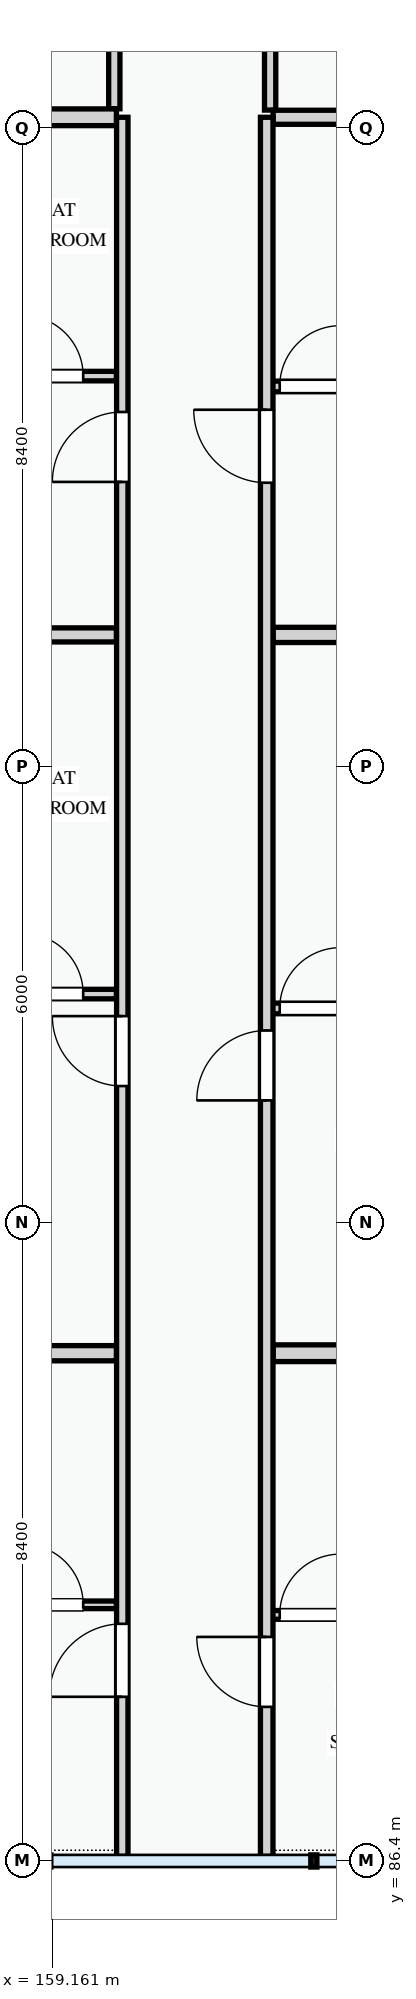
"""IFC4 building model, lengths in metres.
Left out: names, types, materials, properties, quantities, classifications, styles, units other than length and angle.
Written with IfcOpenShell. Run it as: python <this file> out.ifc"""

import sys

from ifc_helpers import new_model, si_unit, direction, frame, frame_2d, origin, place, context, subcontext, project, spatial, rectangle, extrude, element, fill, save


model = new_model("IFC4")
c1 = context("Model", 3, precision=1e-05, world=origin(), true_north=direction((0.0, 1.0)))
c2 = subcontext(c1, "Body", "Model", "MODEL_VIEW")
j1 = project(units=[si_unit("LENGTHUNIT", "METRE"), si_unit("PLANEANGLEUNIT", "RADIAN")], contexts=[c1])
p1 = place(None, origin())
s1 = spatial("IfcSite", under=j1, at=p1, CompositionType="ELEMENT")
p2 = place(p1, origin())
s2 = spatial("IfcBuilding", under=s1, at=p2, CompositionType="ELEMENT")
p3 = place(p2, frame((0.0, 0.0, 37.8)))
s3 = spatial("IfcBuildingStorey", under=s2, at=p3, CompositionType="ELEMENT", Elevation=37.8)
p4 = place(p3, frame((159.975, 113.324, 0.0), z_axis=(0.0, 0.0, 1.0), x_axis=(0.0, -1.0, 0.0)))
e1 = element("IfcWall", 1, at=p4, inside=s3, PredefinedType="PARTITIONING", context=c2, shape_type="SweptSolid", body=[
    extrude(rectangle(XDim=3.872, YDim=0.148, at=frame_2d((1.936, 0.0))), origin(), (0.0, 0.0, 1.0), 3.0),
])
p5 = place(p3, frame((162.025, 113.324, 0.0), z_axis=(0.0, 0.0, 1.0), x_axis=(0.0, -1.0, 0.0)))
e2 = element("IfcWall", 2, at=p5, inside=s3, PredefinedType="PARTITIONING", context=c2, shape_type="SweptSolid", body=[
    extrude(rectangle(XDim=3.889, YDim=0.148, at=frame_2d((1.945, 0.0))), origin(), (0.0, 0.0, 1.0), 3.0),
])
p6 = place(p3, frame((152.524, 89.77, 0.0), z_axis=(0.0, 0.0, 1.0), x_axis=(1.0, 0.0, 0.0)))
e3 = element("IfcWall", 3, at=p6, inside=s3, PredefinedType="PARTITIONING", context=c2, shape_type="SweptSolid", body=[
    extrude(rectangle(XDim=7.479, YDim=0.1, at=frame_2d((3.739, 0.0))), origin(), (0.0, 0.0, 1.0), 3.0),
])
p7 = place(p6, frame((1.339, 0.0, 0.0)))
e4 = element("IfcOpeningElement", 4, at=p7, cuts=e3, PredefinedType="OPENING", context=c2, shape_type="SweptSolid", body=[
    extrude(rectangle(XDim=0.85, YDim=2.1, at=frame_2d((0.425, 1.05))), frame((0.0, 0.06, 0.0), z_axis=(0.0, -1.0, 0.0), x_axis=(1.0, 0.0, 0.0)), (0.0, 0.0, 1.0), 0.12),
])
p8 = place(p6, frame((4.235, 0.0, 0.0)))
e5 = element("IfcOpeningElement", 5, at=p8, cuts=e3, PredefinedType="OPENING", context=c2, shape_type="SweptSolid", body=[
    extrude(rectangle(XDim=0.85, YDim=2.1, at=frame_2d((0.425, 1.05))), frame((0.0, 0.06, 0.0), z_axis=(0.0, -1.0, 0.0), x_axis=(1.0, 0.0, 0.0)), (0.0, 0.0, 1.0), 0.12),
])
p9 = place(p6, frame((6.241, 0.0, 0.0)))
e6 = element("IfcOpeningElement", 6, at=p9, cuts=e3, PredefinedType="OPENING", context=c2, shape_type="SweptSolid", body=[
    extrude(rectangle(XDim=0.8, YDim=2.1, at=frame_2d((0.4, 1.05))), frame((0.0, 0.06, 0.0), z_axis=(0.0, -1.0, 0.0), x_axis=(1.0, 0.0, 0.0)), (0.0, 0.0, 1.0), 0.12),
])
p10 = place(p3, frame((161.98, 89.638, 0.0), z_axis=(0.0, 0.0, 1.0), x_axis=(1.0, 0.0, 0.0)))
e7 = element("IfcWall", 7, at=p10, inside=s3, PredefinedType="PARTITIONING", context=c2, shape_type="SweptSolid", body=[
    extrude(rectangle(XDim=4.696, YDim=0.115, at=frame_2d((2.348, 0.0))), origin(), (0.0, 0.0, 1.0), 3.0),
])
p11 = place(p10, frame((0.171, 0.0, 0.0)))
e8 = element("IfcOpeningElement", 8, at=p11, cuts=e7, PredefinedType="OPENING", context=c2, shape_type="SweptSolid", body=[
    extrude(rectangle(XDim=0.8, YDim=2.1, at=frame_2d((0.4, 1.05))), frame((0.0, 0.067, 0.0), z_axis=(0.0, -1.0, 0.0), x_axis=(1.0, 0.0, 0.0)), (0.0, 0.0, 1.0), 0.135),
])
p12 = place(p10, frame((1.384, 0.0, 0.0)))
e9 = element("IfcOpeningElement", 9, at=p12, cuts=e7, PredefinedType="OPENING", context=c2, shape_type="SweptSolid", body=[
    extrude(rectangle(XDim=0.85, YDim=2.1, at=frame_2d((0.425, 1.05))), frame((0.0, 0.067, 0.0), z_axis=(0.0, -1.0, 0.0), x_axis=(1.0, 0.0, 0.0)), (0.0, 0.0, 1.0), 0.135),
])
p13 = place(p10, frame((3.193, 0.0, 0.0)))
e10 = element("IfcOpeningElement", 10, at=p13, cuts=e7, PredefinedType="OPENING", context=c2, shape_type="SweptSolid", body=[
    extrude(rectangle(XDim=0.85, YDim=2.1, at=frame_2d((0.425, 1.05))), frame((0.0, 0.067, 0.0), z_axis=(0.0, -1.0, 0.0), x_axis=(1.0, 0.0, 0.0)), (0.0, 0.0, 1.0), 0.135),
])
p14 = place(p3, frame((152.46, 97.805, 0.0), z_axis=(0.0, 0.0, 1.0), x_axis=(1.0, 0.0, 0.0)))
e11 = element("IfcWall", 11, at=p14, inside=s3, PredefinedType="PARTITIONING", context=c2, shape_type="SweptSolid", body=[
    extrude(rectangle(XDim=7.543, YDim=0.125, at=frame_2d((3.771, 0.0))), origin(), (0.0, 0.0, 1.0), 3.0),
])
p15 = place(p14, frame((1.404, 0.0, 0.0)))
e12 = element("IfcOpeningElement", 12, at=p15, cuts=e11, PredefinedType="OPENING", context=c2, shape_type="SweptSolid", body=[
    extrude(rectangle(XDim=0.82, YDim=2.08, at=frame_2d((0.41, 1.04))), frame((0.0, 0.073, 0.0), z_axis=(0.0, -1.0, 0.0), x_axis=(1.0, 0.0, 0.0)), (0.0, 0.0, 1.0), 0.145),
])
p16 = place(p14, frame((4.299, 0.0, 0.0)))
e13 = element("IfcOpeningElement", 13, at=p16, cuts=e11, PredefinedType="OPENING", context=c2, shape_type="SweptSolid", body=[
    extrude(rectangle(XDim=0.85, YDim=2.1, at=frame_2d((0.425, 1.05))), frame((0.0, 0.073, 0.0), z_axis=(0.0, -1.0, 0.0), x_axis=(1.0, 0.0, 0.0)), (0.0, 0.0, 1.0), 0.145),
])
p17 = place(p14, frame((6.306, 0.0, 0.0)))
e14 = element("IfcOpeningElement", 14, at=p17, cuts=e11, PredefinedType="OPENING", context=c2, shape_type="SweptSolid", body=[
    extrude(rectangle(XDim=0.8, YDim=2.1, at=frame_2d((0.4, 1.05))), frame((0.0, 0.073, 0.0), z_axis=(0.0, -1.0, 0.0), x_axis=(1.0, 0.0, 0.0)), (0.0, 0.0, 1.0), 0.145),
])
p18 = place(p3, frame((161.98, 97.616, 0.0), z_axis=(0.0, 0.0, 1.0), x_axis=(1.0, 0.0, 0.0)))
e15 = element("IfcWall", 15, at=p18, inside=s3, PredefinedType="PARTITIONING", context=c2, shape_type="SweptSolid", body=[
    extrude(rectangle(XDim=4.696, YDim=0.14, at=frame_2d((2.348, 0.0))), origin(), (0.0, 0.0, 1.0), 3.0),
])
p19 = place(p18, frame((0.171, 0.0, 0.0)))
e16 = element("IfcOpeningElement", 16, at=p19, cuts=e15, PredefinedType="OPENING", context=c2, shape_type="SweptSolid", body=[
    extrude(rectangle(XDim=0.8, YDim=2.1, at=frame_2d((0.4, 1.05))), frame((0.0, 0.08, 0.0), z_axis=(0.0, -1.0, 0.0), x_axis=(1.0, 0.0, 0.0)), (0.0, 0.0, 1.0), 0.16),
])
p20 = place(p18, frame((1.384, 0.0, 0.0)))
e17 = element("IfcOpeningElement", 17, at=p20, cuts=e15, PredefinedType="OPENING", context=c2, shape_type="SweptSolid", body=[
    extrude(rectangle(XDim=0.82, YDim=2.08, at=frame_2d((0.41, 1.04))), frame((0.0, 0.08, 0.0), z_axis=(0.0, -1.0, 0.0), x_axis=(1.0, 0.0, 0.0)), (0.0, 0.0, 1.0), 0.16),
])
p21 = place(p18, frame((3.193, 0.0, 0.0)))
e18 = element("IfcOpeningElement", 18, at=p21, cuts=e15, PredefinedType="OPENING", context=c2, shape_type="SweptSolid", body=[
    extrude(rectangle(XDim=0.85, YDim=2.1, at=frame_2d((0.425, 1.05))), frame((0.0, 0.08, 0.0), z_axis=(0.0, -1.0, 0.0), x_axis=(1.0, 0.0, 0.0)), (0.0, 0.0, 1.0), 0.16),
])
p22 = place(p3, frame((152.524, 93.08, 0.0), z_axis=(0.0, 0.0, 1.0), x_axis=(1.0, 0.0, 0.0)))
e19 = element("IfcWall", 19, at=p22, inside=s3, PredefinedType="PARTITIONING", context=c2, shape_type="SweptSolid", body=[
    extrude(rectangle(XDim=7.479, YDim=0.2, at=frame_2d((3.739, 0.0))), origin(), (0.0, 0.0, 1.0), 3.0),
])
p23 = place(p3, frame((162.064, 93.08, 0.0), z_axis=(0.0, 0.0, 1.0), x_axis=(1.0, 0.0, 0.0)))
e20 = element("IfcWall", 20, at=p23, inside=s3, PredefinedType="PARTITIONING", context=c2, shape_type="SweptSolid", body=[
    extrude(rectangle(XDim=4.611, YDim=0.22, at=frame_2d((2.306, 0.0))), origin(), (0.0, 0.0, 1.0), 3.0),
])
p24 = place(p3, frame((152.524, 105.935, 0.0), z_axis=(0.0, 0.0, 1.0), x_axis=(1.0, 0.0, 0.0)))
e21 = element("IfcWall", 21, at=p24, inside=s3, PredefinedType="PARTITIONING", context=c2, shape_type="SweptSolid", body=[
    extrude(rectangle(XDim=7.479, YDim=0.125, at=frame_2d((3.739, 0.0))), origin(), (0.0, 0.0, 1.0), 3.0),
])
p25 = place(p24, frame((1.339, 0.0, 0.0)))
e22 = element("IfcOpeningElement", 22, at=p25, cuts=e21, PredefinedType="OPENING", context=c2, shape_type="SweptSolid", body=[
    extrude(rectangle(XDim=0.85, YDim=2.1, at=frame_2d((0.425, 1.05))), frame((0.0, 0.073, 0.0), z_axis=(0.0, -1.0, 0.0), x_axis=(1.0, 0.0, 0.0)), (0.0, 0.0, 1.0), 0.145),
])
p26 = place(p24, frame((4.235, 0.0, 0.0)))
e23 = element("IfcOpeningElement", 23, at=p26, cuts=e21, PredefinedType="OPENING", context=c2, shape_type="SweptSolid", body=[
    extrude(rectangle(XDim=0.85, YDim=2.1, at=frame_2d((0.425, 1.05))), frame((0.0, 0.073, 0.0), z_axis=(0.0, -1.0, 0.0), x_axis=(1.0, 0.0, 0.0)), (0.0, 0.0, 1.0), 0.145),
])
p27 = place(p24, frame((6.241, 0.0, 0.0)))
e24 = element("IfcOpeningElement", 24, at=p27, cuts=e21, PredefinedType="OPENING", context=c2, shape_type="SweptSolid", body=[
    extrude(rectangle(XDim=0.8, YDim=2.1, at=frame_2d((0.4, 1.05))), frame((0.0, 0.073, 0.0), z_axis=(0.0, -1.0, 0.0), x_axis=(1.0, 0.0, 0.0)), (0.0, 0.0, 1.0), 0.145),
])
p28 = place(p3, frame((161.98, 105.799, 0.0), z_axis=(0.0, 0.0, 1.0), x_axis=(1.0, 0.0, 0.0)))
e25 = element("IfcWall", 25, at=p28, inside=s3, PredefinedType="PARTITIONING", context=c2, shape_type="SweptSolid", body=[
    extrude(rectangle(XDim=4.696, YDim=0.14, at=frame_2d((2.348, 0.0))), origin(), (0.0, 0.0, 1.0), 3.0),
])
p29 = place(p28, frame((0.171, 0.0, 0.0)))
e26 = element("IfcOpeningElement", 26, at=p29, cuts=e25, PredefinedType="OPENING", context=c2, shape_type="SweptSolid", body=[
    extrude(rectangle(XDim=0.8, YDim=2.1, at=frame_2d((0.4, 1.05))), frame((0.0, 0.08, 0.0), z_axis=(0.0, -1.0, 0.0), x_axis=(1.0, 0.0, 0.0)), (0.0, 0.0, 1.0), 0.16),
])
p30 = place(p28, frame((1.384, 0.0, 0.0)))
e27 = element("IfcOpeningElement", 27, at=p30, cuts=e25, PredefinedType="OPENING", context=c2, shape_type="SweptSolid", body=[
    extrude(rectangle(XDim=0.85, YDim=2.1, at=frame_2d((0.425, 1.05))), frame((0.0, 0.08, 0.0), z_axis=(0.0, -1.0, 0.0), x_axis=(1.0, 0.0, 0.0)), (0.0, 0.0, 1.0), 0.16),
])
p31 = place(p28, frame((3.193, 0.0, 0.0)))
e28 = element("IfcOpeningElement", 28, at=p31, cuts=e25, PredefinedType="OPENING", context=c2, shape_type="SweptSolid", body=[
    extrude(rectangle(XDim=0.85, YDim=2.1, at=frame_2d((0.425, 1.05))), frame((0.0, 0.08, 0.0), z_axis=(0.0, -1.0, 0.0), x_axis=(1.0, 0.0, 0.0)), (0.0, 0.0, 1.0), 0.16),
])
p32 = place(p3, frame((152.524, 102.53, 0.0), z_axis=(0.0, 0.0, 1.0), x_axis=(1.0, 0.0, 0.0)))
e29 = element("IfcWall", 29, at=p32, inside=s3, PredefinedType="PARTITIONING", context=c2, shape_type="SweptSolid", body=[
    extrude(rectangle(XDim=7.479, YDim=0.185, at=frame_2d((3.739, 0.0))), origin(), (0.0, 0.0, 1.0), 3.0),
])
p33 = place(p3, frame((162.064, 102.53, 0.0), z_axis=(0.0, 0.0, 1.0), x_axis=(1.0, 0.0, 0.0)))
e30 = element("IfcWall", 30, at=p33, inside=s3, PredefinedType="PARTITIONING", context=c2, shape_type="SweptSolid", body=[
    extrude(rectangle(XDim=4.611, YDim=0.2, at=frame_2d((2.306, 0.0))), origin(), (0.0, 0.0, 1.0), 3.0),
])
p34 = place(p3, frame((152.46, 109.34, 0.0), z_axis=(0.0, 0.0, 1.0), x_axis=(1.0, 0.0, 0.0)))
e31 = element("IfcWall", 31, at=p34, inside=s3, PredefinedType="PARTITIONING", context=c2, shape_type="SweptSolid", body=[
    extrude(rectangle(XDim=7.543, YDim=0.22, at=frame_2d((3.771, 0.0))), origin(), (0.0, 0.0, 1.0), 2.375),
])
p35 = place(p3, frame((162.064, 109.34, 0.0), z_axis=(0.0, 0.0, 1.0), x_axis=(1.0, 0.0, 0.0)))
e32 = element("IfcWall", 32, at=p35, inside=s3, PredefinedType="PARTITIONING", context=c2, shape_type="SweptSolid", body=[
    extrude(rectangle(XDim=4.611, YDim=0.185, at=frame_2d((2.306, 0.0))), origin(), (0.0, 0.0, 1.0), 2.375),
])
p36 = place(p3, frame((160.08, 86.46, 0.0), z_axis=(0.0, 0.0, 1.0), x_axis=(0.0, 1.0, 0.0)))
e33 = element("IfcWall", 33, at=p36, inside=s3, PredefinedType="PARTITIONING", context=c2, shape_type="SweptSolid", body=[
    extrude(rectangle(XDim=22.88, YDim=0.15, at=frame_2d((11.44, 0.0))), origin(), (0.0, 0.0, 1.0), 3.0),
])
p37 = place(p36, frame((2.1, 0.0, 0.0)))
e34 = element("IfcOpeningElement", 34, at=p37, cuts=e33, PredefinedType="OPENING", context=c2, shape_type="SweptSolid", body=[
    extrude(rectangle(XDim=0.96, YDim=2.12, at=frame_2d((0.48, 1.06))), frame((0.0, 0.085, 0.0), z_axis=(0.0, -1.0, 0.0), x_axis=(1.0, 0.0, 0.0)), (0.0, 0.0, 1.0), 0.17),
])
p38 = place(p36, frame((10.135, 0.0, 0.0)))
e35 = element("IfcOpeningElement", 35, at=p38, cuts=e33, PredefinedType="OPENING", context=c2, shape_type="SweptSolid", body=[
    extrude(rectangle(XDim=0.92, YDim=2.1, at=frame_2d((0.46, 1.05))), frame((0.0, 0.085, 0.0), z_axis=(0.0, -1.0, 0.0), x_axis=(1.0, 0.0, 0.0)), (0.0, 0.0, 1.0), 0.17),
])
p39 = place(p36, frame((18.083, 0.0, 0.0)))
e36 = element("IfcOpeningElement", 36, at=p39, cuts=e33, PredefinedType="OPENING", context=c2, shape_type="SweptSolid", body=[
    extrude(rectangle(XDim=0.92, YDim=2.1, at=frame_2d((0.46, 1.05))), frame((0.0, 0.085, 0.0), z_axis=(0.0, -1.0, 0.0), x_axis=(1.0, 0.0, 0.0)), (0.0, 0.0, 1.0), 0.17),
])
p40 = place(p3, frame((161.98, 86.46, 0.0), z_axis=(0.0, 0.0, 1.0), x_axis=(0.0, 1.0, 0.0)))
e37 = element("IfcWall", 37, at=p40, inside=s3, PredefinedType="PARTITIONING", context=c2, shape_type="SweptSolid", body=[
    extrude(rectangle(XDim=22.88, YDim=0.165, at=frame_2d((11.44, 0.0))), origin(), (0.0, 0.0, 1.0), 3.0),
])
p41 = place(p40, frame((1.968, 0.0, 0.0)))
e38 = element("IfcOpeningElement", 38, at=p41, cuts=e37, PredefinedType="OPENING", context=c2, shape_type="SweptSolid", body=[
    extrude(rectangle(XDim=0.92, YDim=2.1, at=frame_2d((0.46, 1.05))), frame((0.0, 0.093, 0.0), z_axis=(0.0, -1.0, 0.0), x_axis=(1.0, 0.0, 0.0)), (0.0, 0.0, 1.0), 0.185),
])
p42 = place(p40, frame((9.946, 0.0, 0.0)))
e39 = element("IfcOpeningElement", 39, at=p42, cuts=e37, PredefinedType="OPENING", context=c2, shape_type="SweptSolid", body=[
    extrude(rectangle(XDim=0.92, YDim=2.1, at=frame_2d((0.46, 1.05))), frame((0.0, 0.093, 0.0), z_axis=(0.0, -1.0, 0.0), x_axis=(1.0, 0.0, 0.0)), (0.0, 0.0, 1.0), 0.185),
])
p43 = place(p40, frame((18.072, 0.0, 0.0)))
e40 = element("IfcOpeningElement", 40, at=p43, cuts=e37, PredefinedType="OPENING", context=c2, shape_type="SweptSolid", body=[
    extrude(rectangle(XDim=0.96, YDim=2.12, at=frame_2d((0.48, 1.06))), frame((0.0, 0.093, 0.0), z_axis=(0.0, -1.0, 0.0), x_axis=(1.0, 0.0, 0.0)), (0.0, 0.0, 1.0), 0.185),
])
p44 = place(p9, origin())
e41 = element("IfcDoor", 41, at=p44, inside=s3, OperationType="SINGLE_SWING_LEFT", PredefinedType="DOOR", context=c2, shape_type="SweptSolid", body=[
    extrude(rectangle(XDim=0.8, YDim=2.1, at=frame_2d((0.4, 1.05))), frame((0.0, 0.025, 0.0), z_axis=(0.0, -1.0, 0.0), x_axis=(1.0, 0.0, 0.0)), (0.0, 0.0, 1.0), 0.05),
])
fill(e6, e41)
p45 = place(p11, origin())
e42 = element("IfcDoor", 42, at=p45, inside=s3, OperationType="SINGLE_SWING_RIGHT", PredefinedType="DOOR", context=c2, shape_type="SweptSolid", body=[
    extrude(rectangle(XDim=0.8, YDim=2.1, at=frame_2d((0.4, 1.05))), frame((0.0, 0.025, 0.0), z_axis=(0.0, -1.0, 0.0), x_axis=(1.0, 0.0, 0.0)), (0.0, 0.0, 1.0), 0.05),
])
fill(e8, e42)
p46 = place(p17, origin())
e43 = element("IfcDoor", 43, at=p46, inside=s3, OperationType="SINGLE_SWING_LEFT", PredefinedType="DOOR", context=c2, shape_type="SweptSolid", body=[
    extrude(rectangle(XDim=0.8, YDim=2.1, at=frame_2d((0.4, 1.05))), frame((0.0, 0.025, 0.0), z_axis=(0.0, -1.0, 0.0), x_axis=(1.0, 0.0, 0.0)), (0.0, 0.0, 1.0), 0.05),
])
fill(e14, e43)
p47 = place(p19, origin())
e44 = element("IfcDoor", 44, at=p47, inside=s3, OperationType="SINGLE_SWING_RIGHT", PredefinedType="DOOR", context=c2, shape_type="SweptSolid", body=[
    extrude(rectangle(XDim=0.8, YDim=2.1, at=frame_2d((0.4, 1.05))), frame((0.0, 0.025, 0.0), z_axis=(0.0, -1.0, 0.0), x_axis=(1.0, 0.0, 0.0)), (0.0, 0.0, 1.0), 0.05),
])
fill(e16, e44)
p48 = place(p27, origin())
e45 = element("IfcDoor", 45, at=p48, inside=s3, OperationType="SINGLE_SWING_LEFT", PredefinedType="DOOR", context=c2, shape_type="SweptSolid", body=[
    extrude(rectangle(XDim=0.8, YDim=2.1, at=frame_2d((0.4, 1.05))), frame((0.0, 0.025, 0.0), z_axis=(0.0, -1.0, 0.0), x_axis=(1.0, 0.0, 0.0)), (0.0, 0.0, 1.0), 0.05),
])
fill(e24, e45)
p49 = place(p29, origin())
e46 = element("IfcDoor", 46, at=p49, inside=s3, OperationType="SINGLE_SWING_RIGHT", PredefinedType="DOOR", context=c2, shape_type="SweptSolid", body=[
    extrude(rectangle(XDim=0.8, YDim=2.1, at=frame_2d((0.4, 1.05))), frame((0.0, 0.025, 0.0), z_axis=(0.0, -1.0, 0.0), x_axis=(1.0, 0.0, 0.0)), (0.0, 0.0, 1.0), 0.05),
])
fill(e26, e46)
p50 = place(p37, origin())
e47 = element("IfcDoor", 47, at=p50, inside=s3, OperationType="SINGLE_SWING_LEFT", PredefinedType="DOOR", context=c2, shape_type="SweptSolid", body=[
    extrude(rectangle(XDim=0.96, YDim=2.12, at=frame_2d((0.48, 1.06))), frame((0.0, 0.025, 0.0), z_axis=(0.0, -1.0, 0.0), x_axis=(1.0, 0.0, 0.0)), (0.0, 0.0, 1.0), 0.05),
])
fill(e34, e47)
p51 = place(p38, origin())
e48 = element("IfcDoor", 48, at=p51, inside=s3, OperationType="SINGLE_SWING_RIGHT", PredefinedType="DOOR", context=c2, shape_type="SweptSolid", body=[
    extrude(rectangle(XDim=0.92, YDim=2.1, at=frame_2d((0.46, 1.05))), frame((0.0, 0.025, 0.0), z_axis=(0.0, -1.0, 0.0), x_axis=(1.0, 0.0, 0.0)), (0.0, 0.0, 1.0), 0.05),
])
fill(e35, e48)
p52 = place(p39, origin())
e49 = element("IfcDoor", 49, at=p52, inside=s3, OperationType="SINGLE_SWING_LEFT", PredefinedType="DOOR", context=c2, shape_type="SweptSolid", body=[
    extrude(rectangle(XDim=0.92, YDim=2.1, at=frame_2d((0.46, 1.05))), frame((0.0, 0.025, 0.0), z_axis=(0.0, -1.0, 0.0), x_axis=(1.0, 0.0, 0.0)), (0.0, 0.0, 1.0), 0.05),
])
fill(e36, e49)
p53 = place(p41, origin())
e50 = element("IfcDoor", 50, at=p53, inside=s3, OperationType="SINGLE_SWING_RIGHT", PredefinedType="DOOR", context=c2, shape_type="SweptSolid", body=[
    extrude(rectangle(XDim=0.92, YDim=2.1, at=frame_2d((0.46, 1.05))), frame((0.0, 0.025, 0.0), z_axis=(0.0, -1.0, 0.0), x_axis=(1.0, 0.0, 0.0)), (0.0, 0.0, 1.0), 0.05),
])
fill(e38, e50)
p54 = place(p42, origin())
e51 = element("IfcDoor", 51, at=p54, inside=s3, OperationType="SINGLE_SWING_LEFT", PredefinedType="DOOR", context=c2, shape_type="SweptSolid", body=[
    extrude(rectangle(XDim=0.92, YDim=2.1, at=frame_2d((0.46, 1.05))), frame((0.0, 0.025, 0.0), z_axis=(0.0, -1.0, 0.0), x_axis=(1.0, 0.0, 0.0)), (0.0, 0.0, 1.0), 0.05),
])
fill(e39, e51)
p55 = place(p43, origin())
e52 = element("IfcDoor", 52, at=p55, inside=s3, OperationType="SINGLE_SWING_RIGHT", PredefinedType="DOOR", context=c2, shape_type="SweptSolid", body=[
    extrude(rectangle(XDim=0.96, YDim=2.12, at=frame_2d((0.48, 1.06))), frame((0.0, 0.025, 0.0), z_axis=(0.0, -1.0, 0.0), x_axis=(1.0, 0.0, 0.0)), (0.0, 0.0, 1.0), 0.05),
])
fill(e40, e52)
save(model, sys.argv[1])
